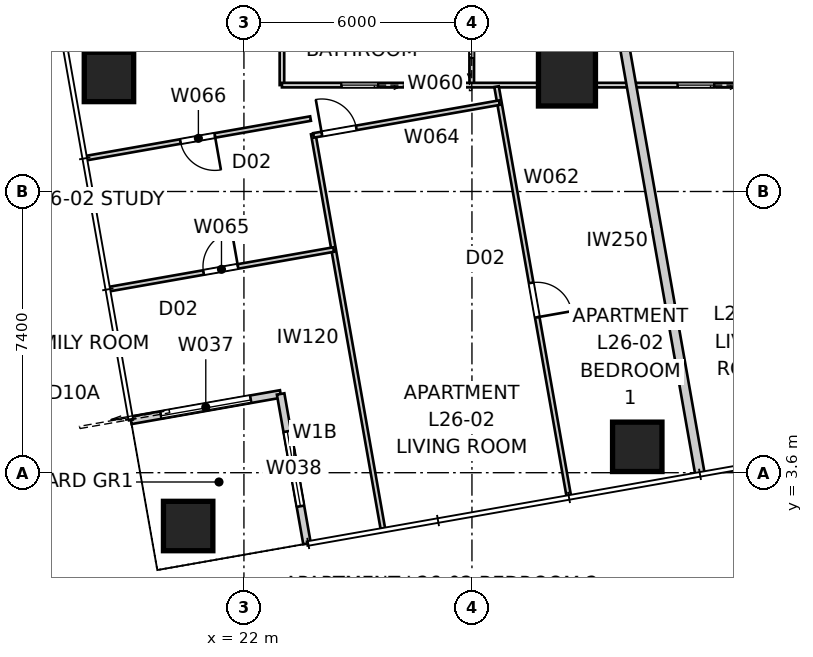
"""IFC4 building model, lengths in metres.
Left out: names, types, materials, properties, quantities, classifications, styles, units other than length and angle.
Written with IfcOpenShell. Run it as: python <this file> out.ifc"""

import sys

from ifc_helpers import new_model, si_unit, direction, frame, frame_2d, origin, origin_2d, place, context, subcontext, project, spatial, rectangle, extrude, element, fill, save


model = new_model("IFC4")
c1 = context("Model", 3, precision=1e-05, world=origin(), true_north=direction((0.0, 1.0)))
c2 = subcontext(c1, "Body", "Model", "MODEL_VIEW")
j1 = project(units=[si_unit("LENGTHUNIT", "METRE"), si_unit("PLANEANGLEUNIT", "RADIAN")], contexts=[c1])
p1 = place(None, origin())
s1 = spatial("IfcSite", under=j1, at=p1, CompositionType="ELEMENT")
p2 = place(p1, origin())
s2 = spatial("IfcBuilding", under=s1, at=p2, CompositionType="ELEMENT")
p3 = place(p2, frame((0.0, 0.0, 96.4)))
s3 = spatial("IfcBuildingStorey", under=s2, at=p3, CompositionType="ELEMENT", Elevation=96.4)
for number, where, z_axis, x_axis in (
    (1, (20.532, 2.197, 0.0), (0.0, 0.0, 1.0), (1.0, 0.0, 0.0)),
    (2, (32.35, 4.281, 0.0), (0.0, 0.0, 1.0), (1.0, 0.0, 0.0)),
    (3, (18.448, 14.015, 0.0), (0.0, 0.0, 1.0), (1.0, 0.0, 0.0)),
):
    element("IfcColumn", number, at=place(p3, frame(where, z_axis=z_axis, x_axis=x_axis)), inside=s3, PredefinedType="COLUMN", context=c2, shape_type="SweptSolid", body=[
        extrude(rectangle(XDim=1.3, YDim=1.3, at=origin_2d()), origin(), (0.0, 0.0, 1.0), 3.4),
    ])
p4 = place(p3, frame((30.5, 14.0, 0.0), z_axis=(0.0, 0.0, 1.0), x_axis=(1.0, 0.0, 0.0)))
e4 = element("IfcColumn", 4, at=p4, inside=s3, PredefinedType="COLUMN", context=c2, shape_type="SweptSolid", body=[
    extrude(rectangle(XDim=1.5, YDim=1.5, at=origin_2d()), origin(), (0.0, 0.0, 1.0), 3.4),
])
p5 = place(p3, frame((19.026, 4.978, 0.0), z_axis=(0.0, 0.0, 1.0), x_axis=(0.984808127031, 0.173646056486, 0.0)))
e5 = element("IfcWall", 5, at=p5, inside=s3, PredefinedType="SOLIDWALL", context=c2, shape_type="SweptSolid", body=[
    extrude(rectangle(XDim=4.0, YDim=0.2, at=frame_2d((2.0, 0.0))), origin(), (0.0, 0.0, 1.0), 3.25),
])
p6 = place(p5, frame((0.8, 0.0, 0.0)))
e6 = element("IfcOpeningElement", 6, at=p6, cuts=e5, PredefinedType="OPENING", context=c2, shape_type="SweptSolid", body=[
    extrude(rectangle(XDim=2.4, YDim=2.1, at=frame_2d((1.2, 1.05))), frame((0.0, 0.11, 0.0), z_axis=(0.0, -1.0, 0.0), x_axis=(1.0, 0.0, 0.0)), (0.0, 0.0, 1.0), 0.22),
])
p7 = place(p3, frame((22.966, 5.672, 0.0), z_axis=(0.0, 0.0, 1.0), x_axis=(0.173646056486, -0.984808127031, 0.0)))
e7 = element("IfcWall", 7, at=p7, inside=s3, PredefinedType="SOLIDWALL", context=c2, shape_type="SweptSolid", body=[
    extrude(rectangle(XDim=4.0, YDim=0.2, at=frame_2d((2.0, 0.0))), origin(), (0.0, 0.0, 1.0), 3.25),
])
p8 = place(p7, frame((1.0, 0.0, 0.45)))
e8 = element("IfcOpeningElement", 8, at=p8, cuts=e7, PredefinedType="OPENING", context=c2, shape_type="SweptSolid", body=[
    extrude(rectangle(XDim=2.0, YDim=1.8, at=frame_2d((1.0, 0.9))), frame((0.0, 0.11, 0.0), z_axis=(0.0, -1.0, 0.0), x_axis=(1.0, 0.0, 0.0)), (0.0, 0.0, 1.0), 0.22),
])
p9 = place(p3, frame((34.001, 3.556, 0.0), z_axis=(0.0, 0.0, 1.0), x_axis=(-0.173639088111, 0.984809355703, 0.0)))
e9 = element("IfcWall", 9, at=p9, inside=s3, PredefinedType="PARTITIONING", context=c2, shape_type="SweptSolid", body=[
    extrude(rectangle(XDim=12.857, YDim=0.25, at=frame_2d((6.428, 0.0))), origin(), (0.0, 0.0, 1.0), 3.25),
])
p10 = place(p3, frame((23.0, 13.8, 0.0), z_axis=(0.0, 0.0, 1.0), x_axis=(0.0, 1.0, 0.0)))
e10 = element("IfcWall", 10, at=p10, inside=s3, PredefinedType="PARTITIONING", context=c2, shape_type="SweptSolid", body=[
    extrude(rectangle(XDim=6.094, YDim=0.12, at=frame_2d((3.047, 0.0))), origin(), (0.0, 0.0, 1.0), 3.25),
])
p11 = place(p10, frame((3.857, 0.0, 0.0)))
e11 = element("IfcOpeningElement", 11, at=p11, cuts=e10, PredefinedType="OPENING", context=c2, shape_type="SweptSolid", body=[
    extrude(rectangle(XDim=0.92, YDim=2.34, at=frame_2d((0.46, 1.17))), frame((0.0, 0.07, 0.0), z_axis=(0.0, -1.0, 0.0), x_axis=(1.0, 0.0, 0.0)), (0.0, 0.0, 1.0), 0.14),
])
p12 = place(p3, frame((27.995, 13.8, 0.0), z_axis=(0.0, 0.0, 1.0), x_axis=(0.0, 1.0, 0.0)))
e12 = element("IfcWall", 12, at=p12, inside=s3, PredefinedType="PARTITIONING", context=c2, shape_type="SweptSolid", body=[
    extrude(rectangle(XDim=2.4, YDim=0.12, at=frame_2d((1.2, 0.0))), origin(), (0.0, 0.0, 1.0), 3.25),
])
p13 = place(p12, frame((0.72, 0.0, 0.0)))
e13 = element("IfcOpeningElement", 13, at=p13, cuts=e12, PredefinedType="OPENING", context=c2, shape_type="SweptSolid", body=[
    extrude(rectangle(XDim=0.96, YDim=2.1, at=frame_2d((0.48, 1.05))), frame((0.0, 0.07, 0.0), z_axis=(0.0, -1.0, 0.0), x_axis=(1.0, 0.0, 0.0)), (0.0, 0.0, 1.0), 0.14),
])
p14 = place(p3, frame((57.0, 13.8, 0.0), z_axis=(0.0, 0.0, 1.0), x_axis=(-1.0, 0.0, 0.0)))
e14 = element("IfcWall", 14, at=p14, inside=s3, PredefinedType="PARTITIONING", context=c2, shape_type="SweptSolid", body=[
    extrude(rectangle(XDim=34.0, YDim=0.12, at=frame_2d((17.0, 0.0))), origin(), (0.0, 0.0, 1.0), 2.55),
])
p15 = place(p14, frame((8.768, 0.0, 0.0)))
e15 = element("IfcOpeningElement", 15, at=p15, cuts=e14, PredefinedType="OPENING", context=c2, shape_type="SweptSolid", body=[
    extrude(rectangle(XDim=0.92, YDim=2.34, at=frame_2d((0.46, 1.17))), frame((0.0, 0.07, 0.0), z_axis=(0.0, -1.0, 0.0), x_axis=(1.0, 0.0, 0.0)), (0.0, 0.0, 1.0), 0.14),
])
p16 = place(p14, frame((10.995, 0.0, 0.0)))
e16 = element("IfcOpeningElement", 16, at=p16, cuts=e14, PredefinedType="OPENING", context=c2, shape_type="SweptSolid", body=[
    extrude(rectangle(XDim=0.92, YDim=2.34, at=frame_2d((0.46, 1.17))), frame((0.0, 0.07, 0.0), z_axis=(0.0, -1.0, 0.0), x_axis=(1.0, 0.0, 0.0)), (0.0, 0.0, 1.0), 0.14),
])
p17 = place(p14, frame((15.486, 0.0, 0.0)))
e17 = element("IfcOpeningElement", 17, at=p17, cuts=e14, PredefinedType="OPENING", context=c2, shape_type="SweptSolid", body=[
    extrude(rectangle(XDim=0.92, YDim=2.34, at=frame_2d((0.46, 1.17))), frame((0.0, 0.07, 0.0), z_axis=(0.0, -1.0, 0.0), x_axis=(1.0, 0.0, 0.0)), (0.0, 0.0, 1.0), 0.14),
])
p18 = place(p14, frame((4.804, 0.0, 0.0)))
e18 = element("IfcOpeningElement", 18, at=p18, cuts=e14, PredefinedType="OPENING", context=c2, shape_type="SweptSolid", body=[
    extrude(rectangle(XDim=0.96, YDim=2.1, at=frame_2d((0.48, 1.05))), frame((0.0, 0.07, 0.0), z_axis=(0.0, -1.0, 0.0), x_axis=(1.0, 0.0, 0.0)), (0.0, 0.0, 1.0), 0.14),
])
p19 = place(p14, frame((19.155, 0.0, 0.0)))
e19 = element("IfcOpeningElement", 19, at=p19, cuts=e14, PredefinedType="OPENING", context=c2, shape_type="SweptSolid", body=[
    extrude(rectangle(XDim=0.96, YDim=2.1, at=frame_2d((0.48, 1.05))), frame((0.0, 0.07, 0.0), z_axis=(0.0, -1.0, 0.0), x_axis=(1.0, 0.0, 0.0)), (0.0, 0.0, 1.0), 0.14),
])
p20 = place(p14, frame((31.473, 0.0, 0.0)))
e20 = element("IfcOpeningElement", 20, at=p20, cuts=e14, PredefinedType="OPENING", context=c2, shape_type="SweptSolid", body=[
    extrude(rectangle(XDim=0.96, YDim=2.1, at=frame_2d((0.48, 1.05))), frame((0.0, 0.07, 0.0), z_axis=(0.0, -1.0, 0.0), x_axis=(1.0, 0.0, 0.0)), (0.0, 0.0, 1.0), 0.14),
])
p21 = place(p14, frame((1.261, 0.0, 0.0)))
e21 = element("IfcOpeningElement", 21, at=p21, cuts=e14, PredefinedType="OPENING", context=c2, shape_type="SweptSolid", body=[
    extrude(rectangle(XDim=0.96, YDim=2.1, at=frame_2d((0.48, 1.05))), frame((0.0, 0.07, 0.0), z_axis=(0.0, -1.0, 0.0), x_axis=(1.0, 0.0, 0.0)), (0.0, 0.0, 1.0), 0.14),
])
p22 = place(p14, frame((22.627, 0.0, 0.0)))
e22 = element("IfcOpeningElement", 22, at=p22, cuts=e14, PredefinedType="OPENING", context=c2, shape_type="SweptSolid", body=[
    extrude(rectangle(XDim=0.96, YDim=2.1, at=frame_2d((0.48, 1.05))), frame((0.0, 0.07, 0.0), z_axis=(0.0, -1.0, 0.0), x_axis=(1.0, 0.0, 0.0)), (0.0, 0.0, 1.0), 0.14),
])
p23 = place(p3, frame((28.648, 13.76, 0.0), z_axis=(0.0, 0.0, 1.0), x_axis=(0.173632532564, -0.984810511538, 0.0)))
e23 = element("IfcWall", 23, at=p23, inside=s3, PredefinedType="PARTITIONING", context=c2, shape_type="SweptSolid", body=[
    extrude(rectangle(XDim=10.938, YDim=0.12, at=frame_2d((5.469, 0.0))), origin(), (0.0, 0.0, 1.0), 2.638),
])
p24 = place(p23, frame((5.243, 0.0, 0.0)))
e24 = element("IfcOpeningElement", 24, at=p24, cuts=e23, PredefinedType="OPENING", context=c2, shape_type="SweptSolid", body=[
    extrude(rectangle(XDim=0.92, YDim=2.34, at=frame_2d((0.46, 1.17))), frame((0.0, 0.07, 0.0), z_axis=(0.0, -1.0, 0.0), x_axis=(1.0, 0.0, 0.0)), (0.0, 0.0, 1.0), 0.14),
])
p25 = place(p3, frame((25.656, 2.126, 0.0), z_axis=(0.0, 0.0, 1.0), x_axis=(-0.173653317458, 0.984806846715, 0.0)))
e25 = element("IfcWall", 25, at=p25, inside=s3, PredefinedType="PARTITIONING", context=c2, shape_type="SweptSolid", body=[
    extrude(rectangle(XDim=10.55, YDim=0.12, at=frame_2d((5.275, 0.0))), origin(), (0.0, 0.0, 1.0), 3.25),
])
p26 = place(p3, frame((23.831, 12.476, 0.0), z_axis=(0.0, 0.0, 1.0), x_axis=(0.984810765884, 0.173631089957, 0.0)))
e26 = element("IfcWall", 26, at=p26, inside=s3, PredefinedType="PARTITIONING", context=c2, shape_type="SweptSolid", body=[
    extrude(rectangle(XDim=4.966, YDim=0.12, at=frame_2d((2.483, 0.0))), origin(), (0.0, 0.0, 1.0), 3.25),
])
p27 = place(p26, frame((0.223, 0.0, 0.0)))
e27 = element("IfcOpeningElement", 27, at=p27, cuts=e26, PredefinedType="OPENING", context=c2, shape_type="SweptSolid", body=[
    extrude(rectangle(XDim=0.92, YDim=2.34, at=frame_2d((0.46, 1.17))), frame((0.0, 0.07, 0.0), z_axis=(0.0, -1.0, 0.0), x_axis=(1.0, 0.0, 0.0)), (0.0, 0.0, 1.0), 0.14),
])
p28 = place(p3, frame((18.458, 8.432, 0.0), z_axis=(0.0, 0.0, 1.0), x_axis=(0.984806924634, 0.173652875567, 0.0)))
e28 = element("IfcWall", 28, at=p28, inside=s3, PredefinedType="PARTITIONING", context=c2, shape_type="SweptSolid", body=[
    extrude(rectangle(XDim=5.993, YDim=0.12, at=frame_2d((2.997, 0.0))), origin(), (0.0, 0.0, 1.0), 3.25),
])
p29 = place(p28, frame((2.517, 0.0, 0.0)))
e29 = element("IfcOpeningElement", 29, at=p29, cuts=e28, PredefinedType="OPENING", context=c2, shape_type="SweptSolid", body=[
    extrude(rectangle(XDim=0.92, YDim=2.34, at=frame_2d((0.46, 1.17))), frame((0.0, 0.07, 0.0), z_axis=(0.0, -1.0, 0.0), x_axis=(1.0, 0.0, 0.0)), (0.0, 0.0, 1.0), 0.14),
])
p30 = place(p3, frame((23.753, 12.919, 0.0), z_axis=(0.0, 0.0, 1.0), x_axis=(-0.984806924634, -0.173652875567, 0.0)))
e30 = element("IfcWall", 30, at=p30, inside=s3, PredefinedType="PARTITIONING", context=c2, shape_type="SweptSolid", body=[
    extrude(rectangle(XDim=5.993, YDim=0.12, at=frame_2d((2.997, 0.0))), origin(), (0.0, 0.0, 1.0), 2.638),
])
p31 = place(p30, frame((2.557, 0.0, 0.0)))
e31 = element("IfcOpeningElement", 31, at=p31, cuts=e30, PredefinedType="OPENING", context=c2, shape_type="SweptSolid", body=[
    extrude(rectangle(XDim=0.92, YDim=2.34, at=frame_2d((0.46, 1.17))), frame((0.0, 0.07, 0.0), z_axis=(0.0, -1.0, 0.0), x_axis=(1.0, 0.0, 0.0)), (0.0, 0.0, 1.0), 0.14),
])
p32 = place(p6, origin())
e32 = element("IfcDoor", 32, at=p32, inside=s3, OperationType="SLIDING_TO_LEFT", PredefinedType="DOOR", context=c2, shape_type="SweptSolid", body=[
    extrude(rectangle(XDim=2.4, YDim=2.1, at=frame_2d((1.2, 1.05))), frame((0.0, 0.025, 0.0), z_axis=(0.0, -1.0, 0.0), x_axis=(1.0, 0.0, 0.0)), (0.0, 0.0, 1.0), 0.05),
])
fill(e6, e32)
p33 = place(p8, origin())
e33 = element("IfcWindow", 33, at=p33, inside=s3, PartitioningType="SINGLE_PANEL", PredefinedType="WINDOW", context=c2, shape_type="SweptSolid", body=[
    extrude(rectangle(XDim=2.0, YDim=1.8, at=frame_2d((1.0, 0.9))), frame((0.0, 0.03, 0.0), z_axis=(0.0, -1.0, 0.0), x_axis=(1.0, 0.0, 0.0)), (0.0, 0.0, 1.0), 0.06),
])
fill(e8, e33)
p34 = place(p13, origin())
e34 = element("IfcDoor", 34, at=p34, inside=s3, OperationType="SLIDING_TO_LEFT", PredefinedType="DOOR", context=c2, shape_type="SweptSolid", body=[
    extrude(rectangle(XDim=0.96, YDim=2.1, at=frame_2d((0.48, 1.05))), frame((0.0, 0.025, 0.0), z_axis=(0.0, -1.0, 0.0), x_axis=(1.0, 0.0, 0.0)), (0.0, 0.0, 1.0), 0.05),
])
fill(e13, e34)
p35 = place(p20, origin())
e35 = element("IfcDoor", 35, at=p35, inside=s3, OperationType="SLIDING_TO_LEFT", PredefinedType="DOOR", context=c2, shape_type="SweptSolid", body=[
    extrude(rectangle(XDim=0.96, YDim=2.1, at=frame_2d((0.48, 1.05))), frame((0.0, 0.025, 0.0), z_axis=(0.0, -1.0, 0.0), x_axis=(1.0, 0.0, 0.0)), (0.0, 0.0, 1.0), 0.05),
])
fill(e20, e35)
p36 = place(p22, origin())
e36 = element("IfcDoor", 36, at=p36, inside=s3, OperationType="SLIDING_TO_LEFT", PredefinedType="DOOR", context=c2, shape_type="SweptSolid", body=[
    extrude(rectangle(XDim=0.96, YDim=2.1, at=frame_2d((0.48, 1.05))), frame((0.0, 0.025, 0.0), z_axis=(0.0, -1.0, 0.0), x_axis=(1.0, 0.0, 0.0)), (0.0, 0.0, 1.0), 0.05),
])
fill(e22, e36)
p37 = place(p31, origin())
e37 = element("IfcDoor", 37, at=p37, inside=s3, OperationType="SINGLE_SWING_LEFT", PredefinedType="DOOR", context=c2, shape_type="SweptSolid", body=[
    extrude(rectangle(XDim=0.92, YDim=2.34, at=frame_2d((0.46, 1.17))), frame((0.0, 0.025, 0.0), z_axis=(0.0, -1.0, 0.0), x_axis=(1.0, 0.0, 0.0)), (0.0, 0.0, 1.0), 0.05),
])
fill(e31, e37)
p38 = place(p27, origin())
e38 = element("IfcDoor", 38, at=p38, inside=s3, OperationType="SINGLE_SWING_LEFT", PredefinedType="DOOR", context=c2, shape_type="SweptSolid", body=[
    extrude(rectangle(XDim=0.92, YDim=2.34, at=frame_2d((0.46, 1.17))), frame((0.0, 0.025, 0.0), z_axis=(0.0, -1.0, 0.0), x_axis=(1.0, 0.0, 0.0)), (0.0, 0.0, 1.0), 0.05),
])
fill(e27, e38)
p39 = place(p29, origin())
e39 = element("IfcDoor", 39, at=p39, inside=s3, OperationType="SINGLE_SWING_RIGHT", PredefinedType="DOOR", context=c2, shape_type="SweptSolid", body=[
    extrude(rectangle(XDim=0.92, YDim=2.34, at=frame_2d((0.46, 1.17))), frame((0.0, 0.025, 0.0), z_axis=(0.0, -1.0, 0.0), x_axis=(1.0, 0.0, 0.0)), (0.0, 0.0, 1.0), 0.05),
])
fill(e29, e39)
p40 = place(p24, origin())
e40 = element("IfcDoor", 40, at=p40, inside=s3, OperationType="SINGLE_SWING_RIGHT", PredefinedType="DOOR", context=c2, shape_type="SweptSolid", body=[
    extrude(rectangle(XDim=0.92, YDim=2.34, at=frame_2d((0.46, 1.17))), frame((0.0, 0.025, 0.0), z_axis=(0.0, -1.0, 0.0), x_axis=(1.0, 0.0, 0.0)), (0.0, 0.0, 1.0), 0.05),
])
fill(e24, e40)
save(model, sys.argv[1])
